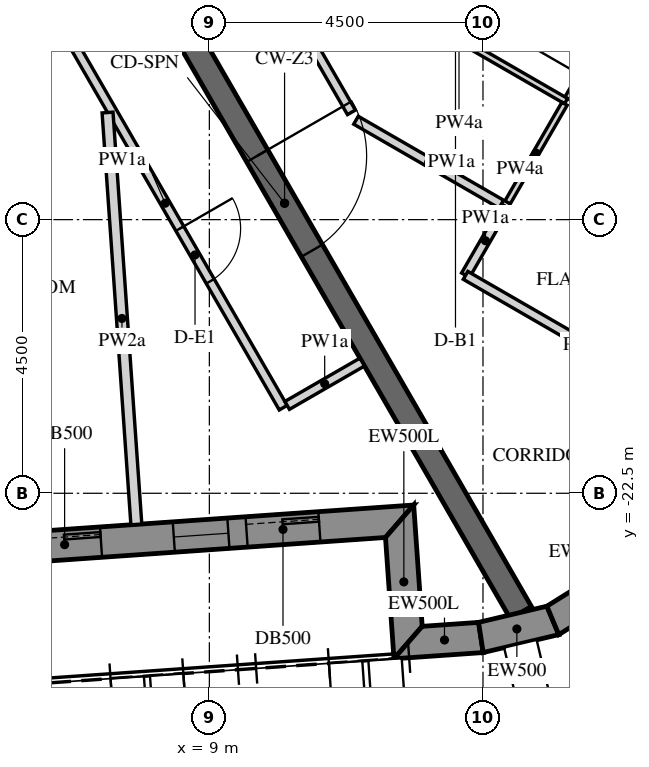
"""IFC4 building model, lengths in metres.
Left out: names, types, materials, properties, quantities, classifications, styles, units other than length and angle.
Written with IfcOpenShell. Run it as: python <this file> out.ifc"""

import sys

from ifc_helpers import new_model, si_unit, direction, frame, frame_2d, origin, place, context, subcontext, project, spatial, polyline, rectangle, outline, extrude, element, fill, save


model = new_model("IFC4")
c1 = context("Model", 3, precision=1e-05, world=origin(), true_north=direction((0.0, 1.0)))
c2 = subcontext(c1, "Body", "Model", "MODEL_VIEW")
j1 = project(units=[si_unit("LENGTHUNIT", "METRE"), si_unit("PLANEANGLEUNIT", "RADIAN")], contexts=[c1])
p1 = place(None, origin())
s1 = spatial("IfcSite", under=j1, at=p1, CompositionType="ELEMENT")
p2 = place(p1, origin())
s2 = spatial("IfcBuilding", under=s1, at=p2, CompositionType="ELEMENT")
p3 = place(p2, frame((0.0, 0.0, 326.4)))
s3 = spatial("IfcBuildingStorey", under=s2, at=p3, CompositionType="ELEMENT", Elevation=326.4)
p4 = place(p3, frame((-10.86, -24.567, -0.15), z_axis=(0.0, 0.0, 1.0), x_axis=(0.997564329317, 0.06975248292, 0.0)))
e1 = element("IfcWall", 1, at=p4, inside=s3, PredefinedType="SOLIDWALL", context=c2, shape_type="SweptSolid", body=[
    extrude(outline(polyline([(0.25, -0.25), (22.795, -0.25), (23.295, 0.25), (-0.25, 0.25), (0.25, -0.25)])), origin(), (0.0, 0.0, 1.0), 3.9),
])
p5 = place(p4, frame((1.323, 0.0, 1.05)))
e2 = element("IfcOpeningElement", 2, at=p5, cuts=e1, PredefinedType="OPENING", context=c2, shape_type="SweptSolid", body=[
    extrude(rectangle(XDim=0.9, YDim=1.5, at=frame_2d((0.45, 0.75))), frame((0.0, 0.26, 0.0), z_axis=(0.0, -1.0, 0.0), x_axis=(1.0, 0.0, 0.0)), (0.0, 0.0, 1.0), 0.52),
])
p6 = place(p4, frame((2.522, 0.0, 0.15)))
e3 = element("IfcOpeningElement", 3, at=p6, cuts=e1, PredefinedType="OPENING", context=c2, shape_type="SweptSolid", body=[
    extrude(rectangle(XDim=1.2, YDim=2.4, at=frame_2d((0.6, 1.2))), frame((0.0, 0.26, 0.0), z_axis=(0.0, -1.0, 0.0), x_axis=(1.0, 0.0, 0.0)), (0.0, 0.0, 1.0), 0.52),
])
p7 = place(p4, frame((4.922, 0.0, 1.05)))
e4 = element("IfcOpeningElement", 4, at=p7, cuts=e1, PredefinedType="OPENING", context=c2, shape_type="SweptSolid", body=[
    extrude(rectangle(XDim=0.9, YDim=1.5, at=frame_2d((0.45, 0.75))), frame((0.0, 0.26, 0.0), z_axis=(0.0, -1.0, 0.0), x_axis=(1.0, 0.0, 0.0)), (0.0, 0.0, 1.0), 0.52),
])
p8 = place(p4, frame((6.122, 0.0, 0.15)))
e5 = element("IfcOpeningElement", 5, at=p8, cuts=e1, PredefinedType="OPENING", context=c2, shape_type="SweptSolid", body=[
    extrude(rectangle(XDim=1.2, YDim=2.4, at=frame_2d((0.6, 1.2))), frame((0.0, 0.26, 0.0), z_axis=(0.0, -1.0, 0.0), x_axis=(1.0, 0.0, 0.0)), (0.0, 0.0, 1.0), 0.52),
])
p9 = place(p4, frame((8.522, 0.0, 1.05)))
e6 = element("IfcOpeningElement", 6, at=p9, cuts=e1, PredefinedType="OPENING", context=c2, shape_type="SweptSolid", body=[
    extrude(rectangle(XDim=0.9, YDim=1.5, at=frame_2d((0.45, 0.75))), frame((0.0, 0.26, 0.0), z_axis=(0.0, -1.0, 0.0), x_axis=(1.0, 0.0, 0.0)), (0.0, 0.0, 1.0), 0.52),
])
p10 = place(p4, frame((9.722, 0.0, 0.15)))
e7 = element("IfcOpeningElement", 7, at=p10, cuts=e1, PredefinedType="OPENING", context=c2, shape_type="SweptSolid", body=[
    extrude(rectangle(XDim=1.2, YDim=2.4, at=frame_2d((0.6, 1.2))), frame((0.0, 0.26, 0.0), z_axis=(0.0, -1.0, 0.0), x_axis=(1.0, 0.0, 0.0)), (0.0, 0.0, 1.0), 0.52),
])
p11 = place(p4, frame((12.122, 0.0, 1.05)))
e8 = element("IfcOpeningElement", 8, at=p11, cuts=e1, PredefinedType="OPENING", context=c2, shape_type="SweptSolid", body=[
    extrude(rectangle(XDim=0.9, YDim=1.5, at=frame_2d((0.45, 0.75))), frame((0.0, 0.26, 0.0), z_axis=(0.0, -1.0, 0.0), x_axis=(1.0, 0.0, 0.0)), (0.0, 0.0, 1.0), 0.52),
])
p12 = place(p4, frame((13.323, 0.0, 0.15)))
e9 = element("IfcOpeningElement", 9, at=p12, cuts=e1, PredefinedType="OPENING", context=c2, shape_type="SweptSolid", body=[
    extrude(rectangle(XDim=1.2, YDim=2.4, at=frame_2d((0.6, 1.2))), frame((0.0, 0.26, 0.0), z_axis=(0.0, -1.0, 0.0), x_axis=(1.0, 0.0, 0.0)), (0.0, 0.0, 1.0), 0.52),
])
p13 = place(p4, frame((15.722, 0.0, 1.05)))
e10 = element("IfcOpeningElement", 10, at=p13, cuts=e1, PredefinedType="OPENING", context=c2, shape_type="SweptSolid", body=[
    extrude(rectangle(XDim=0.9, YDim=1.5, at=frame_2d((0.45, 0.75))), frame((0.0, 0.26, 0.0), z_axis=(0.0, -1.0, 0.0), x_axis=(1.0, 0.0, 0.0)), (0.0, 0.0, 1.0), 0.52),
])
p14 = place(p4, frame((16.922, 0.0, 0.15)))
e11 = element("IfcOpeningElement", 11, at=p14, cuts=e1, PredefinedType="OPENING", context=c2, shape_type="SweptSolid", body=[
    extrude(rectangle(XDim=1.2, YDim=2.4, at=frame_2d((0.6, 1.2))), frame((0.0, 0.26, 0.0), z_axis=(0.0, -1.0, 0.0), x_axis=(1.0, 0.0, 0.0)), (0.0, 0.0, 1.0), 0.52),
])
p15 = place(p4, frame((19.323, 0.0, 1.05)))
e12 = element("IfcOpeningElement", 12, at=p15, cuts=e1, PredefinedType="OPENING", context=c2, shape_type="SweptSolid", body=[
    extrude(rectangle(XDim=0.9, YDim=1.5, at=frame_2d((0.45, 0.75))), frame((0.0, 0.26, 0.0), z_axis=(0.0, -1.0, 0.0), x_axis=(1.0, 0.0, 0.0)), (0.0, 0.0, 1.0), 0.52),
])
p16 = place(p4, frame((20.522, 0.0, 0.15)))
e13 = element("IfcOpeningElement", 13, at=p16, cuts=e1, PredefinedType="OPENING", context=c2, shape_type="SweptSolid", body=[
    extrude(rectangle(XDim=1.2, YDim=2.4, at=frame_2d((0.6, 1.2))), frame((0.0, 0.26, 0.0), z_axis=(0.0, -1.0, 0.0), x_axis=(1.0, 0.0, 0.0)), (0.0, 0.0, 1.0), 0.52),
])
p17 = place(p3, frame((12.129, -22.96, -0.15), z_axis=(0.0, 0.0, 1.0), x_axis=(0.069824268692, -0.99755930726, 0.0)))
e14 = element("IfcWall", 14, at=p17, inside=s3, PredefinedType="SOLIDWALL", context=c2, shape_type="SweptSolid", body=[
    extrude(outline(polyline([(0.25, -0.25), (2.25, -0.25), (1.75, 0.25), (-0.25, 0.25), (0.25, -0.25)])), origin(), (0.0, 0.0, 1.0), 3.9),
])
p18 = place(p3, frame((12.268, -24.955, -0.15), z_axis=(0.0, 0.0, 1.0), x_axis=(0.997561942506, 0.06978660948, 0.0)))
e15 = element("IfcWall", 15, at=p18, inside=s3, PredefinedType="SOLIDWALL", context=c2, shape_type="SweptSolid", body=[
    extrude(outline(polyline([(-0.25, -0.25), (1.22, -0.25), (1.179, 0.25), (0.25, 0.25), (-0.25, -0.25)])), origin(), (0.0, 0.0, 1.0), 3.9),
])
p19 = place(p3, frame((13.465, -24.871, -0.15), z_axis=(0.0, 0.0, 1.0), x_axis=(0.973044740285, 0.230616420501, 0.0)))
e16 = element("IfcWall", 16, at=p19, inside=s3, PredefinedType="SOLIDWALL", context=c2, shape_type="SweptSolid", body=[
    extrude(outline(polyline([(-0.021, -0.25), (1.257, -0.25), (1.175, 0.25), (0.021, 0.25), (-0.021, -0.25)])), origin(), (0.0, 0.0, 1.0), 3.9),
])
p20 = place(p3, frame((14.649, -24.591, -0.15), z_axis=(0.0, 0.0, 1.0), x_axis=(0.848054682072, 0.529908724419, 0.0)))
e17 = element("IfcWall", 17, at=p20, inside=s3, PredefinedType="SOLIDWALL", context=c2, shape_type="SweptSolid", body=[
    extrude(outline(polyline([(-0.041, -0.25), (1.257, -0.25), (1.175, 0.25), (0.041, 0.25), (-0.041, -0.25)])), origin(), (0.0, 0.0, 1.0), 3.9),
])
p21 = place(p3, frame((6.351, -11.0, -0.15), z_axis=(0.0, 0.0, 1.0), x_axis=(0.499998894578, -0.866026041999, 0.0)))
e18 = element("IfcWall", 18, at=p21, inside=s3, PredefinedType="SHEAR", context=c2, shape_type="SweptSolid", body=[
    extrude(rectangle(XDim=15.544, YDim=0.4, at=frame_2d((7.772, 0.0))), origin(), (0.0, 0.0, 1.0), 3.9),
])
p22 = place(p21, frame((6.872, 0.0, 0.15)))
e19 = element("IfcOpeningElement", 19, at=p22, cuts=e18, PredefinedType="OPENING", context=c2, shape_type="SweptSolid", body=[
    extrude(rectangle(XDim=1.8, YDim=2.4, at=frame_2d((0.9, 1.2))), frame((0.0, 0.21, 0.0), z_axis=(0.0, -1.0, 0.0), x_axis=(1.0, 0.0, 0.0)), (0.0, 0.0, 1.0), 0.42),
])
p23 = place(p3, frame((6.333, -14.368, 0.0), z_axis=(0.0, 0.0, 1.0), x_axis=(0.499977396983, -0.866038453249, 0.0)))
e20 = element("IfcWall", 20, at=p23, inside=s3, PredefinedType="PARTITIONING", context=c2, shape_type="SweptSolid", body=[
    extrude(rectangle(XDim=7.764, YDim=0.15, at=frame_2d((3.882, 0.0))), origin(), (0.0, 0.0, 1.0), 2.838),
])
p24 = place(p23, frame((4.364, 0.0, 0.0)))
e21 = element("IfcOpeningElement", 21, at=p24, cuts=e20, PredefinedType="OPENING", context=c2, shape_type="SweptSolid", body=[
    extrude(rectangle(XDim=1.0, YDim=2.1, at=frame_2d((0.5, 1.05))), frame((0.0, 0.085, 0.0), z_axis=(0.0, -1.0, 0.0), x_axis=(1.0, 0.0, 0.0)), (0.0, 0.0, 1.0), 0.17),
])
p25 = place(p3, frame((10.28, -21.055, 0.0), z_axis=(0.0, 0.0, 1.0), x_axis=(0.866020080793, 0.500009219579, 0.0)))
e22 = element("IfcWall", 22, at=p25, inside=s3, PredefinedType="PARTITIONING", context=c2, shape_type="SweptSolid", body=[
    extrude(rectangle(XDim=1.425, YDim=0.15, at=frame_2d((0.712, 0.0))), origin(), (0.0, 0.0, 1.0), 2.838),
])
p26 = place(p3, frame((13.213, -18.915, 0.0), z_axis=(0.0, 0.0, 1.0), x_axis=(0.499985832843, 0.866033583042, 0.0)))
e23 = element("IfcWall", 23, at=p26, inside=s3, PredefinedType="PARTITIONING", context=c2, shape_type="SweptSolid", body=[
    extrude(rectangle(XDim=1.311, YDim=0.15, at=frame_2d((0.655, 0.0))), origin(), (0.0, 0.0, 1.0), 2.838),
])
p27 = place(p3, frame((17.196, -21.216, 0.0), z_axis=(0.0, 0.0, 1.0), x_axis=(-0.866032643562, 0.499987460128, 0.0)))
e24 = element("IfcWall", 24, at=p27, inside=s3, PredefinedType="PARTITIONING", context=c2, shape_type="SweptSolid", body=[
    extrude(rectangle(XDim=4.599, YDim=0.15, at=frame_2d((2.299, 0.0))), origin(), (0.0, 0.0, 1.0), 2.838),
])
p28 = place(p3, frame((13.802, -17.745, 0.0), z_axis=(0.0, 0.0, 1.0), x_axis=(-0.866051521422, 0.499954760196, 0.0)))
e25 = element("IfcWall", 25, at=p28, inside=s3, PredefinedType="PARTITIONING", context=c2, shape_type="SweptSolid", body=[
    extrude(rectangle(XDim=2.76, YDim=0.15, at=frame_2d((1.38, 0.0))), origin(), (0.0, 0.0, 1.0), 2.838),
])
p29 = place(p3, frame((11.337, -16.236, 0.0), z_axis=(0.0, 0.0, 1.0), x_axis=(-0.500029781311, 0.866008208854, 0.0)))
e26 = element("IfcWall", 26, at=p29, inside=s3, PredefinedType="PARTITIONING", context=c2, shape_type="SweptSolid", body=[
    extrude(rectangle(XDim=2.544, YDim=0.15, at=frame_2d((1.272, 0.0))), origin(), (0.0, 0.0, 1.0), 2.838),
])
p30 = place(p3, frame((7.8, -23.012, 0.0), z_axis=(0.0, 0.0, 1.0), x_axis=(-0.069757205717, 0.997563999075, 0.0)))
e27 = element("IfcWall", 27, at=p30, inside=s3, PredefinedType="PARTITIONING", context=c2, shape_type="SweptSolid", body=[
    extrude(rectangle(XDim=6.79, YDim=0.18, at=frame_2d((3.395, 0.0))), origin(), (0.0, 0.0, 1.0), 2.838),
])
p31 = place(p3, frame((14.89, -16.009, 0.0), z_axis=(0.0, 0.0, 1.0), x_axis=(0.499971461383, 0.866041879935, 0.0)))
e28 = element("IfcWall", 28, at=p31, inside=s3, PredefinedType="PARTITIONING", context=c2, shape_type="SweptSolid", body=[
    extrude(rectangle(XDim=1.754, YDim=0.1, at=frame_2d((0.877, 0.0))), origin(), (0.0, 0.0, 1.0), 2.838),
])
p32 = place(p31, frame((0.444, 0.0, 0.0)))
e29 = element("IfcOpeningElement", 29, at=p32, cuts=e28, PredefinedType="OPENING", context=c2, shape_type="SweptSolid", body=[
    extrude(rectangle(XDim=0.9, YDim=2.1, at=frame_2d((0.45, 1.05))), frame((0.0, 0.06, 0.0), z_axis=(0.0, -1.0, 0.0), x_axis=(1.0, 0.0, 0.0)), (0.0, 0.0, 1.0), 0.12),
])
p33 = place(p3, frame((11.345, -14.018, 0.0), z_axis=(0.0, 0.0, 1.0), x_axis=(0.866028600041, -0.49999446388, 0.0)))
e30 = element("IfcWall", 30, at=p33, inside=s3, PredefinedType="PARTITIONING", context=c2, shape_type="SweptSolid", body=[
    extrude(rectangle(XDim=4.066, YDim=0.1, at=frame_2d((2.033, 0.0))), origin(), (0.0, 0.0, 1.0), 2.838),
])
p34 = place(p33, frame((1.566, 0.0, 0.0)))
e31 = element("IfcOpeningElement", 31, at=p34, cuts=e30, PredefinedType="OPENING", context=c2, shape_type="SweptSolid", body=[
    extrude(rectangle(XDim=0.8, YDim=2.1, at=frame_2d((0.4, 1.05))), frame((0.0, 0.06, 0.0), z_axis=(0.0, -1.0, 0.0), x_axis=(1.0, 0.0, 0.0)), (0.0, 0.0, 1.0), 0.12),
])
p35 = place(p3, frame((14.841, -16.094, 0.0), z_axis=(0.0, 0.0, 1.0), x_axis=(-0.500004234368, -0.866022959057, 0.0)))
e32 = element("IfcWall", 32, at=p35, inside=s3, PredefinedType="PARTITIONING", context=c2, shape_type="SweptSolid", body=[
    extrude(rectangle(XDim=1.875, YDim=0.1, at=frame_2d((0.938, 0.0))), origin(), (0.0, 0.0, 1.0), 2.838),
])
p36 = place(p14, frame((0.0, 0.175, 0.0)))
e33 = element("IfcDoor", 33, at=p36, inside=s3, OperationType="SLIDING_TO_LEFT", PredefinedType="DOOR", context=c2, shape_type="SweptSolid", body=[
    extrude(rectangle(XDim=1.2, YDim=2.4, at=frame_2d((0.6, 1.2))), frame((0.0, 0.025, 0.0), z_axis=(0.0, -1.0, 0.0), x_axis=(1.0, 0.0, 0.0)), (0.0, 0.0, 1.0), 0.05),
])
fill(e11, e33)
p37 = place(p15, frame((0.0, 0.18, 0.0)))
e34 = element("IfcWindow", 34, at=p37, inside=s3, PartitioningType="SINGLE_PANEL", PredefinedType="WINDOW", context=c2, shape_type="SweptSolid", body=[
    extrude(rectangle(XDim=0.9, YDim=1.5, at=frame_2d((0.45, 0.75))), frame((0.0, 0.03, 0.0), z_axis=(0.0, -1.0, 0.0), x_axis=(1.0, 0.0, 0.0)), (0.0, 0.0, 1.0), 0.06),
])
fill(e12, e34)
p38 = place(p16, frame((0.0, 0.175, 0.0)))
e35 = element("IfcDoor", 35, at=p38, inside=s3, OperationType="SLIDING_TO_LEFT", PredefinedType="DOOR", context=c2, shape_type="SweptSolid", body=[
    extrude(rectangle(XDim=1.2, YDim=2.4, at=frame_2d((0.6, 1.2))), frame((0.0, 0.025, 0.0), z_axis=(0.0, -1.0, 0.0), x_axis=(1.0, 0.0, 0.0)), (0.0, 0.0, 1.0), 0.05),
])
fill(e13, e35)
p39 = place(p22, origin())
e36 = element("IfcDoor", 36, at=p39, inside=s3, OperationType="DOUBLE_DOOR_SINGLE_SWING", PredefinedType="DOOR", context=c2, shape_type="SweptSolid", body=[
    extrude(rectangle(XDim=1.8, YDim=2.4, at=frame_2d((0.9, 1.2))), frame((0.0, 0.025, 0.0), z_axis=(0.0, -1.0, 0.0), x_axis=(1.0, 0.0, 0.0)), (0.0, 0.0, 1.0), 0.05),
])
fill(e19, e36)
p40 = place(p24, origin())
e37 = element("IfcDoor", 37, at=p40, inside=s3, OperationType="SINGLE_SWING_RIGHT", PredefinedType="DOOR", context=c2, shape_type="SweptSolid", body=[
    extrude(rectangle(XDim=1.0, YDim=2.1, at=frame_2d((0.5, 1.05))), frame((0.0, 0.025, 0.0), z_axis=(0.0, -1.0, 0.0), x_axis=(1.0, 0.0, 0.0)), (0.0, 0.0, 1.0), 0.05),
])
fill(e21, e37)
save(model, sys.argv[1])
